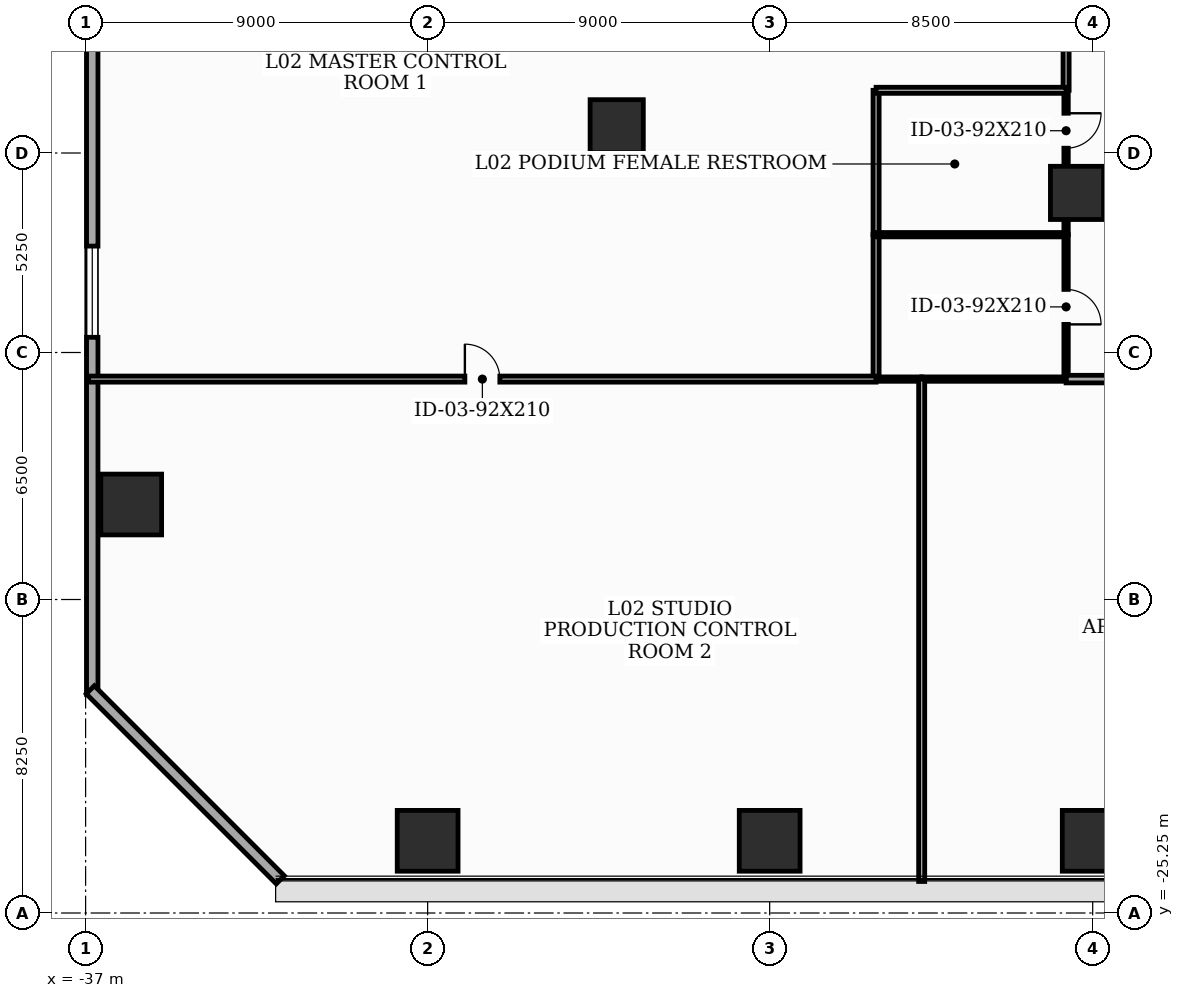
"""IFC4 building model, lengths in metres.
Left out: names, types, materials, properties, quantities, classifications, styles, units other than length and angle.
Written with IfcOpenShell. Run it as: python <this file> out.ifc"""

import sys

from ifc_helpers import new_model, si_unit, direction, frame, frame_2d, origin, origin_2d, place, context, subcontext, project, spatial, rectangle, extrude, element, fill, save


model = new_model("IFC4")
c1 = context("Model", 3, precision=1e-05, world=origin(), true_north=direction((0.0, 1.0)))
c2 = subcontext(c1, "Body", "Model", "MODEL_VIEW")
j1 = project(units=[si_unit("LENGTHUNIT", "METRE"), si_unit("PLANEANGLEUNIT", "RADIAN")], contexts=[c1])
p1 = place(None, origin())
s1 = spatial("IfcSite", under=j1, at=p1, CompositionType="ELEMENT")
p2 = place(p1, origin())
s2 = spatial("IfcBuilding", under=s1, at=p2, CompositionType="ELEMENT")
p3 = place(p2, frame((0.0, 0.0, 10.4)))
s3 = spatial("IfcBuildingStorey", under=s2, at=p3, CompositionType="ELEMENT", Elevation=10.4)
p4 = place(p3, frame((-10.912, -6.3, 0.0), z_axis=(0.0, 0.0, 1.0), x_axis=(1.0, 0.0, 0.0)))
e1 = element("IfcColumn", 1, at=p4, inside=s3, PredefinedType="COLUMN", context=c2, shape_type="SweptSolid", body=[
    extrude(rectangle(XDim=1.4, YDim=1.4, at=origin_2d()), origin(), (0.0, 0.0, 1.0), 5.2),
])
for number, where, z_axis, x_axis in (
    (2, (-28.0, -23.35, 0.0), (0.0, 0.0, 1.0), (1.0, 0.0, 0.0)),
    (3, (-19.0, -23.35, 0.0), (0.0, 0.0, 1.0), (1.0, 0.0, 0.0)),
    (4, (-10.5, -23.35, 0.0), (0.0, 0.0, 1.0), (1.0, 0.0, 0.0)),
    (5, (-35.8, -14.5, 0.0), (0.0, 0.0, 1.0), (1.0, 0.0, 0.0)),
):
    element("IfcColumn", number, at=place(p3, frame(where, z_axis=z_axis, x_axis=x_axis)), inside=s3, PredefinedType="COLUMN", context=c2, shape_type="SweptSolid", body=[
        extrude(rectangle(XDim=1.6, YDim=1.6, at=origin_2d()), origin(), (0.0, 0.0, 1.0), 5.2),
    ])
p5 = place(p3, frame((-23.025, -4.547, 0.0), z_axis=(0.0, 0.0, 1.0), x_axis=(1.0, 0.0, 0.0)))
e6 = element("IfcColumn", 6, at=p5, inside=s3, PredefinedType="COLUMN", context=c2, shape_type="SweptSolid", body=[
    extrude(rectangle(XDim=1.4, YDim=1.4, at=origin_2d()), origin(), (0.0, 0.0, 1.0), 5.2),
])
p6 = place(p3, frame((-36.825, 28.5, 0.0), z_axis=(0.0, 0.0, 1.0), x_axis=(0.0, -1.0, 0.0)))
e7 = element("IfcWall", 7, at=p6, inside=s3, PredefinedType="SOLIDWALL", context=c2, shape_type="SweptSolid", body=[
    extrude(rectangle(XDim=48.0, YDim=0.3, at=frame_2d((24.0, 0.0))), origin(), (0.0, 0.0, 1.0), 4.95),
])
p7 = place(p6, frame((6.2, 0.0, 0.9)))
e8 = element("IfcOpeningElement", 8, at=p7, cuts=e7, PredefinedType="OPENING", context=c2, shape_type="SweptSolid", body=[
    extrude(rectangle(XDim=2.4, YDim=1.35, at=frame_2d((1.2, 0.675))), frame((0.0, 0.16, 0.0), z_axis=(0.0, -1.0, 0.0), x_axis=(1.0, 0.0, 0.0)), (0.0, 0.0, 1.0), 0.32),
])
p8 = place(p6, frame((19.2, 0.0, 0.9)))
e9 = element("IfcOpeningElement", 9, at=p8, cuts=e7, PredefinedType="OPENING", context=c2, shape_type="SweptSolid", body=[
    extrude(rectangle(XDim=1.8, YDim=1.35, at=frame_2d((0.9, 0.675))), frame((0.0, 0.16, 0.0), z_axis=(0.0, -1.0, 0.0), x_axis=(1.0, 0.0, 0.0)), (0.0, 0.0, 1.0), 0.32),
])
p9 = place(p6, frame((36.2, 0.0, 0.9)))
e10 = element("IfcOpeningElement", 10, at=p9, cuts=e7, PredefinedType="OPENING", context=c2, shape_type="SweptSolid", body=[
    extrude(rectangle(XDim=2.4, YDim=1.35, at=frame_2d((1.2, 0.675))), frame((0.0, 0.16, 0.0), z_axis=(0.0, -1.0, 0.0), x_axis=(1.0, 0.0, 0.0)), (0.0, 0.0, 1.0), 0.32),
])
p10 = place(p3, frame((-36.876, -19.376, 0.0), z_axis=(0.0, 0.0, 1.0), x_axis=(0.707106781187, -0.707106781187, 0.0)))
e11 = element("IfcWall", 11, at=p10, inside=s3, PredefinedType="SOLIDWALL", context=c2, shape_type="SweptSolid", body=[
    extrude(rectangle(XDim=7.071, YDim=0.3, at=frame_2d((3.536, 0.0))), origin(), (0.0, 0.0, 1.0), 4.95),
])
p11 = place(p3, frame((-11.2, 4.3, 0.0), z_axis=(0.0, 0.0, 1.0), x_axis=(0.0, -1.0, 0.0)))
e12 = element("IfcWall", 12, at=p11, inside=s3, PredefinedType="PARTITIONING", context=c2, shape_type="SweptSolid", body=[
    extrude(rectangle(XDim=7.9, YDim=0.16, at=frame_2d((3.95, 0.0))), origin(), (0.0, 0.0, 1.0), 4.235),
])
p12 = place(p3, frame((-11.2, -3.6, 0.0), z_axis=(0.0, 0.0, 1.0), x_axis=(0.0, -1.0, 0.0)))
e13 = element("IfcWall", 13, at=p12, inside=s3, PredefinedType="PARTITIONING", context=c2, shape_type="SweptSolid", body=[
    extrude(rectangle(XDim=3.8, YDim=0.115, at=frame_2d((1.9, 0.0))), origin(), (0.0, 0.0, 1.0), 4.235),
])
p13 = place(p12, frame((0.604, 0.0, 0.0)))
e14 = element("IfcOpeningElement", 14, at=p13, cuts=e13, PredefinedType="OPENING", context=c2, shape_type="SweptSolid", body=[
    extrude(rectangle(XDim=0.92, YDim=2.1, at=frame_2d((0.46, 1.05))), frame((0.0, 0.067, 0.0), z_axis=(0.0, -1.0, 0.0), x_axis=(1.0, 0.0, 0.0)), (0.0, 0.0, 1.0), 0.135),
])
p14 = place(p3, frame((-11.2, -7.4, 0.0), z_axis=(0.0, 0.0, 1.0), x_axis=(0.0, -1.0, 0.0)))
e15 = element("IfcWall", 15, at=p14, inside=s3, PredefinedType="PARTITIONING", context=c2, shape_type="SweptSolid", body=[
    extrude(rectangle(XDim=3.8, YDim=0.115, at=frame_2d((1.9, 0.0))), origin(), (0.0, 0.0, 1.0), 4.95),
])
p15 = place(p14, frame((1.44, 0.0, 0.0)))
e16 = element("IfcOpeningElement", 16, at=p15, cuts=e15, PredefinedType="OPENING", context=c2, shape_type="SweptSolid", body=[
    extrude(rectangle(XDim=0.92, YDim=2.1, at=frame_2d((0.46, 1.05))), frame((0.0, 0.067, 0.0), z_axis=(0.0, -1.0, 0.0), x_axis=(1.0, 0.0, 0.0)), (0.0, 0.0, 1.0), 0.135),
])
p16 = place(p3, frame((-11.2, -11.2, 0.0), z_axis=(0.0, 0.0, 1.0), x_axis=(1.0, 0.0, 0.0)))
e17 = element("IfcWall", 17, at=p16, inside=s3, PredefinedType="SOLIDWALL", context=c2, shape_type="SweptSolid", body=[
    extrude(rectangle(XDim=15.2, YDim=0.2, at=frame_2d((7.6, 0.0))), origin(), (0.0, 0.0, 1.0), 3.435),
])
p17 = place(p16, frame((7.125, 0.0, 0.0)))
e18 = element("IfcOpeningElement", 18, at=p17, cuts=e17, PredefinedType="OPENING", context=c2, shape_type="SweptSolid", body=[
    extrude(rectangle(XDim=0.95, YDim=2.1, at=frame_2d((0.475, 1.05))), frame((0.0, 0.11, 0.0), z_axis=(0.0, -1.0, 0.0), x_axis=(1.0, 0.0, 0.0)), (0.0, 0.0, 1.0), 0.22),
])
p18 = place(p3, frame((-16.2, -7.4, 0.0), z_axis=(0.0, 0.0, 1.0), x_axis=(0.0, 1.0, 0.0)))
e19 = element("IfcWall", 19, at=p18, inside=s3, PredefinedType="PARTITIONING", context=c2, shape_type="SweptSolid", body=[
    extrude(rectangle(XDim=3.8, YDim=0.16, at=frame_2d((1.9, 0.0))), origin(), (0.0, 0.0, 1.0), 4.235),
])
p19 = place(p3, frame((-16.2, -3.6, 0.0), z_axis=(0.0, 0.0, 1.0), x_axis=(1.0, 0.0, 0.0)))
e20 = element("IfcWall", 20, at=p19, inside=s3, PredefinedType="PARTITIONING", context=c2, shape_type="SweptSolid", body=[
    extrude(rectangle(XDim=5.0, YDim=0.16, at=frame_2d((2.5, 0.0))), origin(), (0.0, 0.0, 1.0), 4.235),
])
p20 = place(p3, frame((-16.2, -11.2, 0.0), z_axis=(0.0, 0.0, 1.0), x_axis=(0.0, 1.0, 0.0)))
e21 = element("IfcWall", 21, at=p20, inside=s3, PredefinedType="PARTITIONING", context=c2, shape_type="SweptSolid", body=[
    extrude(rectangle(XDim=3.8, YDim=0.16, at=frame_2d((1.9, 0.0))), origin(), (0.0, 0.0, 1.0), 4.95),
])
p21 = place(p3, frame((-36.92, -11.2, 0.0), z_axis=(0.0, 0.0, 1.0), x_axis=(1.0, 0.0, 0.0)))
e22 = element("IfcWall", 22, at=p21, inside=s3, PredefinedType="PARTITIONING", context=c2, shape_type="SweptSolid", body=[
    extrude(rectangle(XDim=20.72, YDim=0.16, at=frame_2d((10.36, 0.0))), origin(), (0.0, 0.0, 1.0), 3.435),
])
p22 = place(p21, frame((9.9, 0.0, 0.0)))
e23 = element("IfcOpeningElement", 23, at=p22, cuts=e22, PredefinedType="OPENING", context=c2, shape_type="SweptSolid", body=[
    extrude(rectangle(XDim=0.92, YDim=2.1, at=frame_2d((0.46, 1.05))), frame((0.0, 0.09, 0.0), z_axis=(0.0, -1.0, 0.0), x_axis=(1.0, 0.0, 0.0)), (0.0, 0.0, 1.0), 0.18),
])
p23 = place(p3, frame((-16.2, -7.4, 0.0), z_axis=(0.0, 0.0, 1.0), x_axis=(1.0, 0.0, 0.0)))
e24 = element("IfcWall", 24, at=p23, inside=s3, PredefinedType="PARTITIONING", context=c2, shape_type="SweptSolid", body=[
    extrude(rectangle(XDim=5.0, YDim=0.115, at=frame_2d((2.5, 0.0))), origin(), (0.0, 0.0, 1.0), 4.95),
])
p24 = place(p3, frame((-16.2, -11.2, 0.0), z_axis=(0.0, 0.0, 1.0), x_axis=(1.0, 0.0, 0.0)))
e25 = element("IfcWall", 25, at=p24, inside=s3, PredefinedType="PARTITIONING", context=c2, shape_type="SweptSolid", body=[
    extrude(rectangle(XDim=1.2, YDim=0.115, at=frame_2d((0.6, 0.0))), origin(), (0.0, 0.0, 1.0), 4.95),
])
p25 = place(p3, frame((-15.0, -11.2, 0.0), z_axis=(0.0, 0.0, 1.0), x_axis=(1.0, 0.0, 0.0)))
e26 = element("IfcWall", 26, at=p25, inside=s3, PredefinedType="PARTITIONING", context=c2, shape_type="SweptSolid", body=[
    extrude(rectangle(XDim=3.8, YDim=0.115, at=frame_2d((1.9, 0.0))), origin(), (0.0, 0.0, 1.0), 4.95),
])
p26 = place(p3, frame((-15.0, -24.42, 0.0), z_axis=(0.0, 0.0, 1.0), x_axis=(0.0, 1.0, 0.0)))
e27 = element("IfcWall", 27, at=p26, inside=s3, PredefinedType="PARTITIONING", context=c2, shape_type="SweptSolid", body=[
    extrude(rectangle(XDim=13.22, YDim=0.16, at=frame_2d((6.61, 0.0))), origin(), (0.0, 0.0, 1.0), 3.435),
])
p27 = place(p9, origin())
e28 = element("IfcWindow", 28, at=p27, inside=s3, PartitioningType="SINGLE_PANEL", PredefinedType="WINDOW", context=c2, shape_type="SweptSolid", body=[
    extrude(rectangle(XDim=2.4, YDim=1.35, at=frame_2d((1.2, 0.675))), frame((0.0, 0.03, 0.0), z_axis=(0.0, -1.0, 0.0), x_axis=(1.0, 0.0, 0.0)), (0.0, 0.0, 1.0), 0.06),
])
fill(e10, e28)
p28 = place(p13, origin())
e29 = element("IfcDoor", 29, at=p28, inside=s3, OperationType="SINGLE_SWING_LEFT", PredefinedType="DOOR", context=c2, shape_type="SweptSolid", body=[
    extrude(rectangle(XDim=0.92, YDim=2.1, at=frame_2d((0.46, 1.05))), frame((0.0, 0.025, 0.0), z_axis=(0.0, -1.0, 0.0), x_axis=(1.0, 0.0, 0.0)), (0.0, 0.0, 1.0), 0.05),
])
fill(e14, e29)
p29 = place(p15, origin())
e30 = element("IfcDoor", 30, at=p29, inside=s3, OperationType="SINGLE_SWING_RIGHT", PredefinedType="DOOR", context=c2, shape_type="SweptSolid", body=[
    extrude(rectangle(XDim=0.92, YDim=2.1, at=frame_2d((0.46, 1.05))), frame((0.0, 0.025, 0.0), z_axis=(0.0, -1.0, 0.0), x_axis=(1.0, 0.0, 0.0)), (0.0, 0.0, 1.0), 0.05),
])
fill(e16, e30)
p30 = place(p22, origin())
e31 = element("IfcDoor", 31, at=p30, inside=s3, OperationType="SINGLE_SWING_LEFT", PredefinedType="DOOR", context=c2, shape_type="SweptSolid", body=[
    extrude(rectangle(XDim=0.92, YDim=2.1, at=frame_2d((0.46, 1.05))), frame((0.0, 0.025, 0.0), z_axis=(0.0, -1.0, 0.0), x_axis=(1.0, 0.0, 0.0)), (0.0, 0.0, 1.0), 0.05),
])
fill(e23, e31)
save(model, sys.argv[1])
